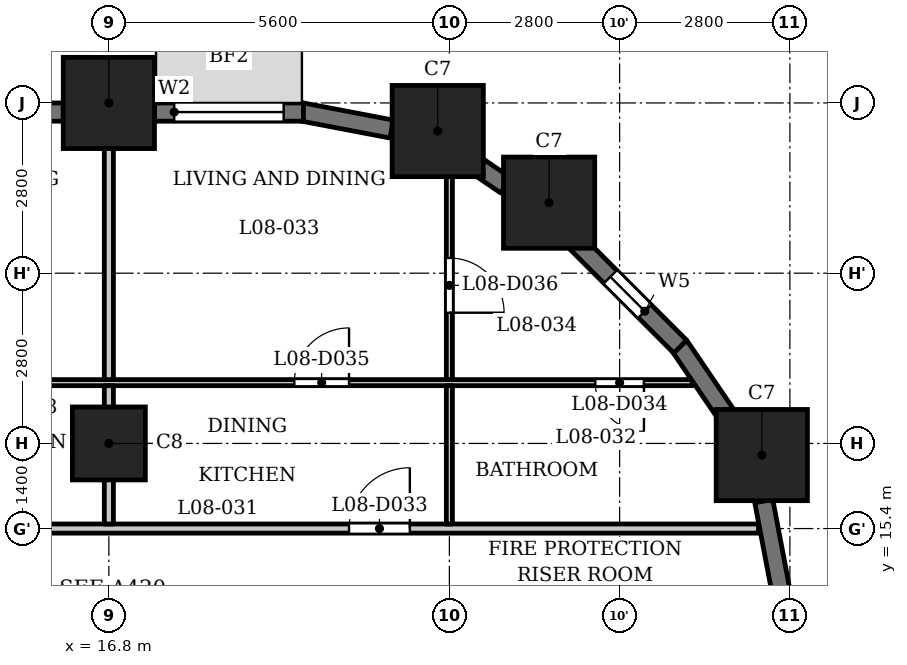
"""IFC4 building model, lengths in metres.
Left out: names, types, materials, properties, quantities, classifications, styles, units other than length and angle.
Written with IfcOpenShell. Run it as: python <this file> out.ifc"""

import sys

from ifc_helpers import new_model, si_unit, direction, frame, frame_2d, origin, origin_2d, place, context, subcontext, project, spatial, rectangle, extrude, element, fill, save


model = new_model("IFC4")
c1 = context("Model", 3, precision=1e-05, world=origin(), true_north=direction((0.0, 1.0)))
c2 = subcontext(c1, "Body", "Model", "MODEL_VIEW")
j1 = project(units=[si_unit("LENGTHUNIT", "METRE"), si_unit("PLANEANGLEUNIT", "RADIAN")], contexts=[c1])
p1 = place(None, origin())
s1 = spatial("IfcSite", under=j1, at=p1, CompositionType="ELEMENT")
p2 = place(p1, origin())
s2 = spatial("IfcBuilding", under=s1, at=p2, CompositionType="ELEMENT")
p3 = place(p2, frame((0.0, 0.0, 37.5)))
s3 = spatial("IfcBuildingStorey", under=s2, at=p3, CompositionType="ELEMENT", Elevation=37.5)
for number, where, z_axis, x_axis in (
    (1, (27.538, 16.609, 0.0), (0.0, 0.0, 1.0), (1.0, 0.0, 0.0)),
    (2, (24.04, 20.76, 0.0), (0.0, 0.0, 1.0), (1.0, 0.0, 0.0)),
    (3, (22.209, 21.938, 0.0), (0.0, 0.0, 1.0), (1.0, 0.0, 0.0)),
    (4, (16.8, 22.4, 0.0), (0.0, 0.0, 1.0), (1.0, 0.0, 0.0)),
):
    element("IfcColumn", number, at=place(p3, frame(where, z_axis=z_axis, x_axis=x_axis)), inside=s3, PredefinedType="COLUMN", context=c2, shape_type="SweptSolid", body=[
        extrude(rectangle(XDim=1.5, YDim=1.5, at=origin_2d()), origin(), (0.0, 0.0, 1.0), 3.5),
    ])
p4 = place(p3, frame((16.8, 16.8, 0.0), z_axis=(0.0, 0.0, 1.0), x_axis=(1.0, 0.0, 0.0)))
e5 = element("IfcColumn", 5, at=p4, inside=s3, PredefinedType="COLUMN", context=c2, shape_type="SweptSolid", body=[
    extrude(rectangle(XDim=1.2, YDim=1.2, at=origin_2d()), origin(), (0.0, 0.0, 1.0), 3.5),
])
for number, where, z_axis, x_axis in (
    (6, (27.853, 14.372, 0.0), (0.0, 0.0, 1.0), (-0.187, 0.982, 0.0)),
    (7, (27.025, 17.167, 0.0), (0.0, 0.0, 1.0), (-0.562, 0.827, 0.0)),
):
    element("IfcWall", number, at=place(p3, frame(where, z_axis=z_axis, x_axis=x_axis)), inside=s3, PredefinedType="SOLIDWALL", context=c2, shape_type="SweptSolid", body=[
        extrude(rectangle(XDim=1.506, YDim=0.3, at=frame_2d((0.753, 0.0))), origin(), (0.0, 0.0, 1.0), 2.35),
    ])
p5 = place(p3, frame((26.197, 18.391, 0.0), z_axis=(0.0, 0.0, 1.0), x_axis=(-0.707106781187, 0.707106781187, 0.0)))
e8 = element("IfcWall", 8, at=p5, inside=s3, PredefinedType="SOLIDWALL", context=c2, shape_type="SweptSolid", body=[
    extrude(rectangle(XDim=2.45, YDim=0.3, at=frame_2d((1.225, 0.0))), origin(), (0.0, 0.0, 1.0), 2.35),
])
p6 = place(p5, frame((0.825, 0.0, 0.6)))
e9 = element("IfcOpeningElement", 9, at=p6, cuts=e8, PredefinedType="OPENING", context=c2, shape_type="SweptSolid", body=[
    extrude(rectangle(XDim=0.8, YDim=1.55, at=frame_2d((0.4, 0.775))), frame((0.0, 0.16, 0.0), z_axis=(0.0, -1.0, 0.0), x_axis=(1.0, 0.0, 0.0)), (0.0, 0.0, 1.0), 0.32),
])
p7 = place(p3, frame((23.327, 21.045, 0.0), z_axis=(0.0, 0.0, 1.0), x_axis=(-0.827080706709, 0.562083182981, 0.0)))
e10 = element("IfcWall", 10, at=p7, inside=s3, PredefinedType="SOLIDWALL", context=c2, shape_type="SweptSolid", body=[
    extrude(rectangle(XDim=0.677, YDim=0.3, at=frame_2d((0.339, 0.0))), origin(), (0.0, 0.0, 1.0), 3.2),
])
p8 = place(p3, frame((21.451, 21.97, 0.0), z_axis=(0.0, 0.0, 1.0), x_axis=(-0.982287454367, 0.187380247071, 0.0)))
e11 = element("IfcWall", 11, at=p8, inside=s3, PredefinedType="SOLIDWALL", context=c2, shape_type="SweptSolid", body=[
    extrude(rectangle(XDim=1.506, YDim=0.3, at=frame_2d((0.753, 0.0))), origin(), (0.0, 0.0, 1.0), 2.35),
])
p9 = place(p3, frame((20.0, 22.25, 0.0), z_axis=(0.0, 0.0, 1.0), x_axis=(-1.0, 0.0, 0.0)))
e12 = element("IfcWall", 12, at=p9, inside=s3, PredefinedType="SOLIDWALL", context=c2, shape_type="SweptSolid", body=[
    extrude(rectangle(XDim=2.45, YDim=0.3, at=frame_2d((1.225, 0.0))), origin(), (0.0, 0.0, 1.0), 2.35),
])
p10 = place(p9, frame((0.325, 0.0, 0.9)))
e13 = element("IfcOpeningElement", 13, at=p10, cuts=e12, PredefinedType="OPENING", context=c2, shape_type="SweptSolid", body=[
    extrude(rectangle(XDim=1.8, YDim=1.25, at=frame_2d((0.9, 0.625))), frame((0.0, 0.16, 0.0), z_axis=(0.0, -1.0, 0.0), x_axis=(1.0, 0.0, 0.0)), (0.0, 0.0, 1.0), 0.32),
])
p11 = place(p3, frame((16.05, 22.25, 0.0), z_axis=(0.0, 0.0, 1.0), x_axis=(-1.0, 0.0, 0.0)))
e14 = element("IfcWall", 14, at=p11, inside=s3, PredefinedType="SOLIDWALL", context=c2, shape_type="SweptSolid", body=[
    extrude(rectangle(XDim=4.1, YDim=0.3, at=frame_2d((2.05, 0.0))), origin(), (0.0, 0.0, 1.0), 2.35),
])
p12 = place(p11, frame((0.25, 0.0, 1.2)))
e15 = element("IfcOpeningElement", 15, at=p12, cuts=e14, PredefinedType="OPENING", context=c2, shape_type="SweptSolid", body=[
    extrude(rectangle(XDim=3.6, YDim=0.95, at=frame_2d((1.8, 0.475))), frame((0.0, 0.16, 0.0), z_axis=(0.0, -1.0, 0.0), x_axis=(1.0, 0.0, 0.0)), (0.0, 0.0, 1.0), 0.32),
])
p13 = place(p3, frame((-27.484, 15.4, 0.0), z_axis=(0.0, 0.0, 1.0), x_axis=(1.0, 0.0, 0.0)))
e16 = element("IfcWall", 16, at=p13, inside=s3, PredefinedType="PARTITIONING", context=c2, shape_type="SweptSolid", body=[
    extrude(rectangle(XDim=54.968, YDim=0.15, at=frame_2d((27.484, 0.0))), origin(), (0.0, 0.0, 1.0), 3.2),
])
p14 = place(p13, frame((8.784, 0.0, 0.0)))
e17 = element("IfcOpeningElement", 17, at=p14, cuts=e16, PredefinedType="OPENING", context=c2, shape_type="SweptSolid", body=[
    extrude(rectangle(XDim=1.0, YDim=2.1, at=frame_2d((0.5, 1.05))), frame((0.0, 0.085, 0.0), z_axis=(0.0, -1.0, 0.0), x_axis=(1.0, 0.0, 0.0)), (0.0, 0.0, 1.0), 0.17),
])
p15 = place(p13, frame((14.634, 0.0, 0.0)))
e18 = element("IfcOpeningElement", 18, at=p15, cuts=e16, PredefinedType="OPENING", context=c2, shape_type="SweptSolid", body=[
    extrude(rectangle(XDim=1.0, YDim=2.1, at=frame_2d((0.5, 1.05))), frame((0.0, 0.085, 0.0), z_axis=(0.0, -1.0, 0.0), x_axis=(1.0, 0.0, 0.0)), (0.0, 0.0, 1.0), 0.17),
])
p16 = place(p13, frame((23.834, 0.0, 0.0)))
e19 = element("IfcOpeningElement", 19, at=p16, cuts=e16, PredefinedType="OPENING", context=c2, shape_type="SweptSolid", body=[
    extrude(rectangle(XDim=1.0, YDim=2.1, at=frame_2d((0.5, 1.05))), frame((0.0, 0.085, 0.0), z_axis=(0.0, -1.0, 0.0), x_axis=(1.0, 0.0, 0.0)), (0.0, 0.0, 1.0), 0.17),
])
p17 = place(p13, frame((28.184, 0.0, 0.0)))
e20 = element("IfcOpeningElement", 20, at=p17, cuts=e16, PredefinedType="OPENING", context=c2, shape_type="SweptSolid", body=[
    extrude(rectangle(XDim=1.0, YDim=2.1, at=frame_2d((0.5, 1.05))), frame((0.0, 0.085, 0.0), z_axis=(0.0, -1.0, 0.0), x_axis=(1.0, 0.0, 0.0)), (0.0, 0.0, 1.0), 0.17),
])
p18 = place(p13, frame((41.884, 0.0, 0.0)))
e21 = element("IfcOpeningElement", 21, at=p18, cuts=e16, PredefinedType="OPENING", context=c2, shape_type="SweptSolid", body=[
    extrude(rectangle(XDim=1.0, YDim=2.1, at=frame_2d((0.5, 1.05))), frame((0.0, 0.085, 0.0), z_axis=(0.0, -1.0, 0.0), x_axis=(1.0, 0.0, 0.0)), (0.0, 0.0, 1.0), 0.17),
])
p19 = place(p13, frame((48.234, 0.0, 0.0)))
e22 = element("IfcOpeningElement", 22, at=p19, cuts=e16, PredefinedType="OPENING", context=c2, shape_type="SweptSolid", body=[
    extrude(rectangle(XDim=1.0, YDim=2.1, at=frame_2d((0.5, 1.05))), frame((0.0, 0.085, 0.0), z_axis=(0.0, -1.0, 0.0), x_axis=(1.0, 0.0, 0.0)), (0.0, 0.0, 1.0), 0.17),
])
p20 = place(p3, frame((-26.732, 17.8, 0.0), z_axis=(0.0, 0.0, 1.0), x_axis=(1.0, 0.0, 0.0)))
e23 = element("IfcWall", 23, at=p20, inside=s3, PredefinedType="PARTITIONING", context=c2, shape_type="SweptSolid", body=[
    extrude(rectangle(XDim=53.126, YDim=0.1, at=frame_2d((26.563, 0.0))), origin(), (0.0, 0.0, 1.0), 3.2),
])
p21 = place(p20, frame((2.964, 0.0, 0.0)))
e24 = element("IfcOpeningElement", 24, at=p21, cuts=e23, PredefinedType="OPENING", context=c2, shape_type="SweptSolid", body=[
    extrude(rectangle(XDim=0.8, YDim=2.1, at=frame_2d((0.4, 1.05))), frame((0.0, 0.06, 0.0), z_axis=(0.0, -1.0, 0.0), x_axis=(1.0, 0.0, 0.0)), (0.0, 0.0, 1.0), 0.12),
])
p22 = place(p20, frame((7.132, 0.0, 0.0)))
e25 = element("IfcOpeningElement", 25, at=p22, cuts=e23, PredefinedType="OPENING", context=c2, shape_type="SweptSolid", body=[
    extrude(rectangle(XDim=0.9, YDim=2.1, at=frame_2d((0.45, 1.05))), frame((0.0, 0.06, 0.0), z_axis=(0.0, -1.0, 0.0), x_axis=(1.0, 0.0, 0.0)), (0.0, 0.0, 1.0), 0.12),
])
p23 = place(p20, frame((19.432, 0.0, 0.0)))
e26 = element("IfcOpeningElement", 26, at=p23, cuts=e23, PredefinedType="OPENING", context=c2, shape_type="SweptSolid", body=[
    extrude(rectangle(XDim=0.8, YDim=2.1, at=frame_2d((0.4, 1.05))), frame((0.0, 0.06, 0.0), z_axis=(0.0, -1.0, 0.0), x_axis=(1.0, 0.0, 0.0)), (0.0, 0.0, 1.0), 0.12),
])
p24 = place(p20, frame((16.732, 0.0, 0.0)))
e27 = element("IfcOpeningElement", 27, at=p24, cuts=e23, PredefinedType="OPENING", context=c2, shape_type="SweptSolid", body=[
    extrude(rectangle(XDim=0.9, YDim=2.1, at=frame_2d((0.45, 1.05))), frame((0.0, 0.06, 0.0), z_axis=(0.0, -1.0, 0.0), x_axis=(1.0, 0.0, 0.0)), (0.0, 0.0, 1.0), 0.12),
])
p25 = place(p20, frame((10.982, 0.0, 0.0)))
e28 = element("IfcOpeningElement", 28, at=p25, cuts=e23, PredefinedType="OPENING", context=c2, shape_type="SweptSolid", body=[
    extrude(rectangle(XDim=0.9, YDim=2.1, at=frame_2d((0.45, 1.05))), frame((0.0, 0.06, 0.0), z_axis=(0.0, -1.0, 0.0), x_axis=(1.0, 0.0, 0.0)), (0.0, 0.0, 1.0), 0.12),
])
p26 = place(p20, frame((12.982, 0.0, 0.0)))
e29 = element("IfcOpeningElement", 29, at=p26, cuts=e23, PredefinedType="OPENING", context=c2, shape_type="SweptSolid", body=[
    extrude(rectangle(XDim=0.9, YDim=2.1, at=frame_2d((0.45, 1.05))), frame((0.0, 0.06, 0.0), z_axis=(0.0, -1.0, 0.0), x_axis=(1.0, 0.0, 0.0)), (0.0, 0.0, 1.0), 0.12),
])
p27 = place(p20, frame((25.382, 0.0, 0.0)))
e30 = element("IfcOpeningElement", 30, at=p27, cuts=e23, PredefinedType="OPENING", context=c2, shape_type="SweptSolid", body=[
    extrude(rectangle(XDim=0.8, YDim=2.1, at=frame_2d((0.4, 1.05))), frame((0.0, 0.06, 0.0), z_axis=(0.0, -1.0, 0.0), x_axis=(1.0, 0.0, 0.0)), (0.0, 0.0, 1.0), 0.12),
])
p28 = place(p20, frame((22.182, 0.0, 0.0)))
e31 = element("IfcOpeningElement", 31, at=p28, cuts=e23, PredefinedType="OPENING", context=c2, shape_type="SweptSolid", body=[
    extrude(rectangle(XDim=0.9, YDim=2.1, at=frame_2d((0.45, 1.05))), frame((0.0, 0.06, 0.0), z_axis=(0.0, -1.0, 0.0), x_axis=(1.0, 0.0, 0.0)), (0.0, 0.0, 1.0), 0.12),
])
p29 = place(p20, frame((36.232, 0.0, 0.0)))
e32 = element("IfcOpeningElement", 32, at=p29, cuts=e23, PredefinedType="OPENING", context=c2, shape_type="SweptSolid", body=[
    extrude(rectangle(XDim=0.8, YDim=2.1, at=frame_2d((0.4, 1.05))), frame((0.0, 0.06, 0.0), z_axis=(0.0, -1.0, 0.0), x_axis=(1.0, 0.0, 0.0)), (0.0, 0.0, 1.0), 0.12),
])
p30 = place(p20, frame((33.782, 0.0, 0.0)))
e33 = element("IfcOpeningElement", 33, at=p30, cuts=e23, PredefinedType="OPENING", context=c2, shape_type="SweptSolid", body=[
    extrude(rectangle(XDim=0.9, YDim=2.1, at=frame_2d((0.45, 1.05))), frame((0.0, 0.06, 0.0), z_axis=(0.0, -1.0, 0.0), x_axis=(1.0, 0.0, 0.0)), (0.0, 0.0, 1.0), 0.12),
])
p31 = place(p20, frame((27.282, 0.0, 0.0)))
e34 = element("IfcOpeningElement", 34, at=p31, cuts=e23, PredefinedType="OPENING", context=c2, shape_type="SweptSolid", body=[
    extrude(rectangle(XDim=0.9, YDim=2.1, at=frame_2d((0.45, 1.05))), frame((0.0, 0.06, 0.0), z_axis=(0.0, -1.0, 0.0), x_axis=(1.0, 0.0, 0.0)), (0.0, 0.0, 1.0), 0.12),
])
p32 = place(p20, frame((30.282, 0.0, 0.0)))
e35 = element("IfcOpeningElement", 35, at=p32, cuts=e23, PredefinedType="OPENING", context=c2, shape_type="SweptSolid", body=[
    extrude(rectangle(XDim=0.9, YDim=2.1, at=frame_2d((0.45, 1.05))), frame((0.0, 0.06, 0.0), z_axis=(0.0, -1.0, 0.0), x_axis=(1.0, 0.0, 0.0)), (0.0, 0.0, 1.0), 0.12),
])
p33 = place(p20, frame((38.582, 0.0, 0.0)))
e36 = element("IfcOpeningElement", 36, at=p33, cuts=e23, PredefinedType="OPENING", context=c2, shape_type="SweptSolid", body=[
    extrude(rectangle(XDim=0.8, YDim=2.1, at=frame_2d((0.4, 1.05))), frame((0.0, 0.06, 0.0), z_axis=(0.0, -1.0, 0.0), x_axis=(1.0, 0.0, 0.0)), (0.0, 0.0, 1.0), 0.12),
])
p34 = place(p20, frame((41.232, 0.0, 0.0)))
e37 = element("IfcOpeningElement", 37, at=p34, cuts=e23, PredefinedType="OPENING", context=c2, shape_type="SweptSolid", body=[
    extrude(rectangle(XDim=0.9, YDim=2.1, at=frame_2d((0.45, 1.05))), frame((0.0, 0.06, 0.0), z_axis=(0.0, -1.0, 0.0), x_axis=(1.0, 0.0, 0.0)), (0.0, 0.0, 1.0), 0.12),
])
p35 = place(p20, frame((51.532, 0.0, 0.0)))
e38 = element("IfcOpeningElement", 38, at=p35, cuts=e23, PredefinedType="OPENING", context=c2, shape_type="SweptSolid", body=[
    extrude(rectangle(XDim=0.8, YDim=2.1, at=frame_2d((0.4, 1.05))), frame((0.0, 0.06, 0.0), z_axis=(0.0, -1.0, 0.0), x_axis=(1.0, 0.0, 0.0)), (0.0, 0.0, 1.0), 0.12),
])
p36 = place(p20, frame((46.582, 0.0, 0.0)))
e39 = element("IfcOpeningElement", 39, at=p36, cuts=e23, PredefinedType="OPENING", context=c2, shape_type="SweptSolid", body=[
    extrude(rectangle(XDim=0.9, YDim=2.1, at=frame_2d((0.45, 1.05))), frame((0.0, 0.06, 0.0), z_axis=(0.0, -1.0, 0.0), x_axis=(1.0, 0.0, 0.0)), (0.0, 0.0, 1.0), 0.12),
])
p37 = place(p3, frame((16.8, 15.475, 0.0), z_axis=(0.0, 0.0, 1.0), x_axis=(0.0, 1.0, 0.0)))
e40 = element("IfcWall", 40, at=p37, inside=s3, PredefinedType="PARTITIONING", context=c2, shape_type="SweptSolid", body=[
    extrude(rectangle(XDim=2.275, YDim=0.15, at=frame_2d((1.137, 0.0))), origin(), (0.0, 0.0, 1.0), 3.2),
])
p38 = place(p3, frame((16.8, 17.85, 0.0), z_axis=(0.0, 0.0, 1.0), x_axis=(0.0, 1.0, 0.0)))
e41 = element("IfcWall", 41, at=p38, inside=s3, PredefinedType="PARTITIONING", context=c2, shape_type="SweptSolid", body=[
    extrude(rectangle(XDim=5.28, YDim=0.15, at=frame_2d((2.64, 0.0))), origin(), (0.0, 0.0, 1.0), 3.2),
])
p39 = place(p3, frame((22.4, 15.475, 0.0), z_axis=(0.0, 0.0, 1.0), x_axis=(0.0, 1.0, 0.0)))
e42 = element("IfcWall", 42, at=p39, inside=s3, PredefinedType="PARTITIONING", context=c2, shape_type="SweptSolid", body=[
    extrude(rectangle(XDim=2.275, YDim=0.1, at=frame_2d((1.137, 0.0))), origin(), (0.0, 0.0, 1.0), 3.2),
])
p40 = place(p3, frame((22.4, 17.85, 0.0), z_axis=(0.0, 0.0, 1.0), x_axis=(0.0, 1.0, 0.0)))
e43 = element("IfcWall", 43, at=p40, inside=s3, PredefinedType="PARTITIONING", context=c2, shape_type="SweptSolid", body=[
    extrude(rectangle(XDim=3.87, YDim=0.1, at=frame_2d((1.935, 0.0))), origin(), (0.0, 0.0, 1.0), 3.2),
])
p41 = place(p40, frame((1.1, 0.0, 0.0)))
e44 = element("IfcOpeningElement", 44, at=p41, cuts=e43, PredefinedType="OPENING", context=c2, shape_type="SweptSolid", body=[
    extrude(rectangle(XDim=0.9, YDim=2.1, at=frame_2d((0.45, 1.05))), frame((0.0, 0.06, 0.0), z_axis=(0.0, -1.0, 0.0), x_axis=(1.0, 0.0, 0.0)), (0.0, 0.0, 1.0), 0.12),
])
p42 = place(p19, origin())
e45 = element("IfcDoor", 45, at=p42, inside=s3, OperationType="SINGLE_SWING_LEFT", PredefinedType="DOOR", context=c2, shape_type="SweptSolid", body=[
    extrude(rectangle(XDim=1.0, YDim=2.1, at=frame_2d((0.5, 1.05))), frame((0.0, 0.025, 0.0), z_axis=(0.0, -1.0, 0.0), x_axis=(1.0, 0.0, 0.0)), (0.0, 0.0, 1.0), 0.05),
])
fill(e22, e45)
p43 = place(p35, origin())
e46 = element("IfcDoor", 46, at=p43, inside=s3, OperationType="SINGLE_SWING_RIGHT", PredefinedType="DOOR", context=c2, shape_type="SweptSolid", body=[
    extrude(rectangle(XDim=0.8, YDim=2.1, at=frame_2d((0.4, 1.05))), frame((0.0, 0.025, 0.0), z_axis=(0.0, -1.0, 0.0), x_axis=(1.0, 0.0, 0.0)), (0.0, 0.0, 1.0), 0.05),
])
fill(e38, e46)
p44 = place(p36, origin())
e47 = element("IfcDoor", 47, at=p44, inside=s3, OperationType="SINGLE_SWING_LEFT", PredefinedType="DOOR", context=c2, shape_type="SweptSolid", body=[
    extrude(rectangle(XDim=0.9, YDim=2.1, at=frame_2d((0.45, 1.05))), frame((0.0, 0.025, 0.0), z_axis=(0.0, -1.0, 0.0), x_axis=(1.0, 0.0, 0.0)), (0.0, 0.0, 1.0), 0.05),
])
fill(e39, e47)
p45 = place(p41, origin())
e48 = element("IfcDoor", 48, at=p45, inside=s3, OperationType="SINGLE_SWING_LEFT", PredefinedType="DOOR", context=c2, shape_type="SweptSolid", body=[
    extrude(rectangle(XDim=0.9, YDim=2.1, at=frame_2d((0.45, 1.05))), frame((0.0, 0.025, 0.0), z_axis=(0.0, -1.0, 0.0), x_axis=(1.0, 0.0, 0.0)), (0.0, 0.0, 1.0), 0.05),
])
fill(e44, e48)
p46 = place(p6, origin())
e49 = element("IfcWindow", 49, at=p46, inside=s3, PartitioningType="SINGLE_PANEL", PredefinedType="WINDOW", context=c2, shape_type="SweptSolid", body=[
    extrude(rectangle(XDim=0.8, YDim=1.55, at=frame_2d((0.4, 0.775))), frame((0.0, 0.03, 0.0), z_axis=(0.0, -1.0, 0.0), x_axis=(1.0, 0.0, 0.0)), (0.0, 0.0, 1.0), 0.06),
])
fill(e9, e49)
p47 = place(p10, origin())
e50 = element("IfcWindow", 50, at=p47, inside=s3, PartitioningType="SINGLE_PANEL", PredefinedType="WINDOW", context=c2, shape_type="SweptSolid", body=[
    extrude(rectangle(XDim=1.8, YDim=1.25, at=frame_2d((0.9, 0.625))), frame((0.0, 0.03, 0.0), z_axis=(0.0, -1.0, 0.0), x_axis=(1.0, 0.0, 0.0)), (0.0, 0.0, 1.0), 0.06),
])
fill(e13, e50)
save(model, sys.argv[1])
